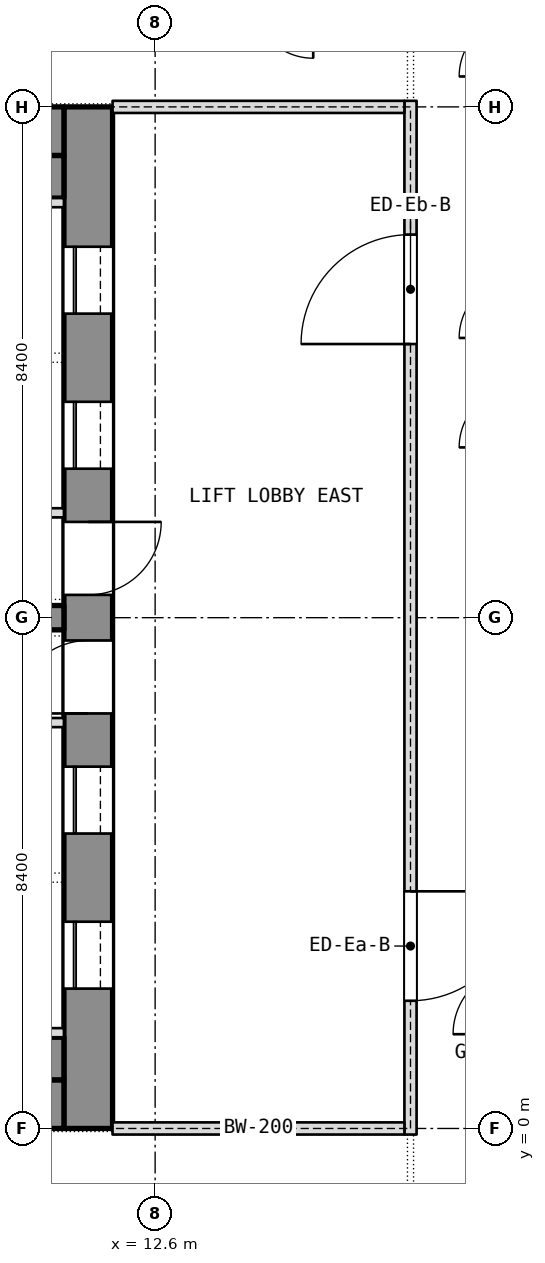
"""IFC4 building model, lengths in metres.
Left out: names, types, materials, properties, quantities, classifications, styles, units other than length and angle.
Written with IfcOpenShell. Run it as: python <this file> out.ifc"""

import sys

from ifc_helpers import new_model, si_unit, direction, frame, frame_2d, origin, place, context, subcontext, project, spatial, rectangle, extrude, element, fill, save


model = new_model("IFC4")
c1 = context("Model", 3, precision=1e-05, world=origin(), true_north=direction((0.0, 1.0)))
c2 = subcontext(c1, "Body", "Model", "MODEL_VIEW")
j1 = project(units=[si_unit("LENGTHUNIT", "METRE"), si_unit("PLANEANGLEUNIT", "RADIAN")], contexts=[c1])
p1 = place(None, origin())
s1 = spatial("IfcSite", under=j1, at=p1, CompositionType="ELEMENT")
p2 = place(p1, origin())
s2 = spatial("IfcBuilding", under=s1, at=p2, CompositionType="ELEMENT")
p3 = place(p2, frame((0.0, 0.0, 234.5)))
s3 = spatial("IfcBuildingStorey", under=s2, at=p3, CompositionType="ELEMENT", Elevation=234.5)
p4 = place(p3, frame((11.5, 0.0, 0.0), z_axis=(0.0, 0.0, 1.0), x_axis=(0.0, 1.0, 0.0)))
e1 = element("IfcWall", 1, at=p4, inside=s3, PredefinedType="SHEAR", context=c2, shape_type="SweptSolid", body=[
    extrude(rectangle(XDim=16.8, YDim=0.8, at=frame_2d((8.4, 0.0))), origin(), (0.0, 0.0, 1.0), 3.6),
])
p5 = place(p4, frame((2.3, 0.0, 0.0)))
e2 = element("IfcOpeningElement", 2, at=p5, cuts=e1, PredefinedType="OPENING", context=c2, shape_type="SweptSolid", body=[
    extrude(rectangle(XDim=1.1, YDim=2.1, at=frame_2d((0.55, 1.05))), frame((0.0, 0.4, 0.0), z_axis=(0.0, -1.0, 0.0), x_axis=(1.0, 0.0, 0.0)), (0.0, 0.0, 1.0), 0.8),
])
p6 = place(p4, frame((4.85, 0.0, 0.0)))
e3 = element("IfcOpeningElement", 3, at=p6, cuts=e1, PredefinedType="OPENING", context=c2, shape_type="SweptSolid", body=[
    extrude(rectangle(XDim=1.1, YDim=2.1, at=frame_2d((0.55, 1.05))), frame((0.0, 0.4, 0.0), z_axis=(0.0, -1.0, 0.0), x_axis=(1.0, 0.0, 0.0)), (0.0, 0.0, 1.0), 0.8),
])
p7 = place(p4, frame((6.825, 0.0, 0.0)))
e4 = element("IfcOpeningElement", 4, at=p7, cuts=e1, PredefinedType="OPENING", context=c2, shape_type="SweptSolid", body=[
    extrude(rectangle(XDim=1.2, YDim=2.1, at=frame_2d((0.6, 1.05))), frame((0.0, 0.4, 0.0), z_axis=(0.0, -1.0, 0.0), x_axis=(1.0, 0.0, 0.0)), (0.0, 0.0, 1.0), 0.8),
])
p8 = place(p4, frame((13.4, 0.0, 0.0)))
e5 = element("IfcOpeningElement", 5, at=p8, cuts=e1, PredefinedType="OPENING", context=c2, shape_type="SweptSolid", body=[
    extrude(rectangle(XDim=1.1, YDim=2.1, at=frame_2d((0.55, 1.05))), frame((0.0, 0.4, 0.0), z_axis=(0.0, -1.0, 0.0), x_axis=(1.0, 0.0, 0.0)), (0.0, 0.0, 1.0), 0.8),
])
p9 = place(p4, frame((10.85, 0.0, 0.0)))
e6 = element("IfcOpeningElement", 6, at=p9, cuts=e1, PredefinedType="OPENING", context=c2, shape_type="SweptSolid", body=[
    extrude(rectangle(XDim=1.1, YDim=2.1, at=frame_2d((0.55, 1.05))), frame((0.0, 0.4, 0.0), z_axis=(0.0, -1.0, 0.0), x_axis=(1.0, 0.0, 0.0)), (0.0, 0.0, 1.0), 0.8),
])
p10 = place(p4, frame((8.775, 0.0, 0.0)))
e7 = element("IfcOpeningElement", 7, at=p10, cuts=e1, PredefinedType="OPENING", context=c2, shape_type="SweptSolid", body=[
    extrude(rectangle(XDim=1.2, YDim=2.1, at=frame_2d((0.6, 1.05))), frame((0.0, 0.4, 0.0), z_axis=(0.0, -1.0, 0.0), x_axis=(1.0, 0.0, 0.0)), (0.0, 0.0, 1.0), 0.8),
])
for number, where, z_axis, x_axis in (
    (8, (-11.1, 0.4, 0.0), (0.0, 0.0, 1.0), (1.0, 0.0, 0.0)),
    (9, (-11.1, 16.4, 0.0), (0.0, 0.0, 1.0), (1.0, 0.0, 0.0)),
):
    element("IfcWall", number, at=place(p3, frame(where, z_axis=z_axis, x_axis=x_axis)), inside=s3, PredefinedType="SHEAR", context=c2, shape_type="SweptSolid", body=[
        extrude(rectangle(XDim=22.2, YDim=0.8, at=frame_2d((11.1, 0.0))), origin(), (0.0, 0.0, 1.0), 3.6),
    ])
p11 = place(p3, frame((4.4, 8.4, 0.0), z_axis=(0.0, 0.0, 1.0), x_axis=(1.0, 0.0, 0.0)))
e10 = element("IfcWall", 10, at=p11, inside=s3, PredefinedType="SHEAR", context=c2, shape_type="SweptSolid", body=[
    extrude(rectangle(XDim=6.7, YDim=0.4, at=frame_2d((3.35, 0.0))), origin(), (0.0, 0.0, 1.0), 3.6),
])
for number, where, z_axis, x_axis in (
    (11, (-11.1, 1.15, 0.0), (0.0, 0.0, 1.0), (1.0, 0.0, 0.0)),
    (12, (-11.1, 15.65, 0.0), (0.0, 0.0, 1.0), (1.0, 0.0, 0.0)),
):
    element("IfcWall", number, at=place(p3, frame(where, z_axis=z_axis, x_axis=x_axis)), inside=s3, PredefinedType="PARTITIONING", context=c2, shape_type="SweptSolid", body=[
        extrude(rectangle(XDim=22.2, YDim=0.7, at=frame_2d((11.1, 0.0))), origin(), (0.0, 0.0, 1.0), 3.34),
    ])
for number, where, z_axis, x_axis in (
    (13, (9.0, 6.675, 0.0), (0.0, 0.0, 1.0), (1.0, 0.0, 0.0)),
    (14, (9.0, 1.575, 0.0), (0.0, 0.0, 1.0), (1.0, 0.0, 0.0)),
    (15, (9.0, 10.125, 0.0), (0.0, 0.0, 1.0), (1.0, 0.0, 0.0)),
    (16, (9.0, 15.225, 0.0), (0.0, 0.0, 1.0), (1.0, 0.0, 0.0)),
):
    element("IfcWall", number, at=place(p3, frame(where, z_axis=z_axis, x_axis=x_axis)), inside=s3, PredefinedType="SHEAR", context=c2, shape_type="SweptSolid", body=[
        extrude(rectangle(XDim=2.1, YDim=0.15, at=frame_2d((1.05, 0.0))), origin(), (0.0, 0.0, 1.0), 3.6),
    ])
p12 = place(p3, frame((16.8, -0.1, 0.0), z_axis=(0.0, 0.0, 1.0), x_axis=(0.0, 1.0, 0.0)))
e17 = element("IfcWall", 17, at=p12, inside=s3, PredefinedType="PARTITIONING", context=c2, shape_type="SweptSolid", body=[
    extrude(rectangle(XDim=17.0, YDim=0.2, at=frame_2d((8.5, 0.0))), origin(), (0.0, 0.0, 1.0), 3.34),
])
p13 = place(p12, frame((2.2, 0.0, 0.0)))
e18 = element("IfcOpeningElement", 18, at=p13, cuts=e17, PredefinedType="OPENING", context=c2, shape_type="SweptSolid", body=[
    extrude(rectangle(XDim=1.8, YDim=2.1, at=frame_2d((0.9, 1.05))), frame((0.0, 0.1, 0.0), z_axis=(0.0, -1.0, 0.0), x_axis=(1.0, 0.0, 0.0)), (0.0, 0.0, 1.0), 0.2),
])
p14 = place(p12, frame((13.0, 0.0, 0.0)))
e19 = element("IfcOpeningElement", 19, at=p14, cuts=e17, PredefinedType="OPENING", context=c2, shape_type="SweptSolid", body=[
    extrude(rectangle(XDim=1.8, YDim=2.1, at=frame_2d((0.9, 1.05))), frame((0.0, 0.1, 0.0), z_axis=(0.0, -1.0, 0.0), x_axis=(1.0, 0.0, 0.0)), (0.0, 0.0, 1.0), 0.2),
])
for number, where, z_axis, x_axis in (
    (20, (11.9, 0.0, 0.0), (0.0, 0.0, 1.0), (1.0, 0.0, 0.0)),
    (21, (11.9, 16.8, 0.0), (0.0, 0.0, 1.0), (1.0, 0.0, 0.0)),
):
    element("IfcWall", number, at=place(p3, frame(where, z_axis=z_axis, x_axis=x_axis)), inside=s3, PredefinedType="PARTITIONING", context=c2, shape_type="SweptSolid", body=[
        extrude(rectangle(XDim=4.8, YDim=0.2, at=frame_2d((2.4, 0.0))), origin(), (0.0, 0.0, 1.0), 2.94),
    ])
p15 = place(p5, origin())
e22 = element("IfcDoor", 22, at=p15, inside=s3, OperationType="SLIDING_TO_LEFT", PredefinedType="DOOR", context=c2, shape_type="SweptSolid", body=[
    extrude(rectangle(XDim=1.1, YDim=2.1, at=frame_2d((0.55, 1.05))), frame((0.0, 0.025, 0.0), z_axis=(0.0, -1.0, 0.0), x_axis=(1.0, 0.0, 0.0)), (0.0, 0.0, 1.0), 0.05),
])
fill(e2, e22)
p16 = place(p6, origin())
e23 = element("IfcDoor", 23, at=p16, inside=s3, OperationType="SLIDING_TO_LEFT", PredefinedType="DOOR", context=c2, shape_type="SweptSolid", body=[
    extrude(rectangle(XDim=1.1, YDim=2.1, at=frame_2d((0.55, 1.05))), frame((0.0, 0.025, 0.0), z_axis=(0.0, -1.0, 0.0), x_axis=(1.0, 0.0, 0.0)), (0.0, 0.0, 1.0), 0.05),
])
fill(e3, e23)
p17 = place(p7, origin())
e24 = element("IfcDoor", 24, at=p17, inside=s3, OperationType="SINGLE_SWING_LEFT", PredefinedType="DOOR", context=c2, shape_type="SweptSolid", body=[
    extrude(rectangle(XDim=1.2, YDim=2.1, at=frame_2d((0.6, 1.05))), frame((0.0, 0.025, 0.0), z_axis=(0.0, -1.0, 0.0), x_axis=(1.0, 0.0, 0.0)), (0.0, 0.0, 1.0), 0.05),
])
fill(e4, e24)
p18 = place(p8, origin())
e25 = element("IfcDoor", 25, at=p18, inside=s3, OperationType="SLIDING_TO_LEFT", PredefinedType="DOOR", context=c2, shape_type="SweptSolid", body=[
    extrude(rectangle(XDim=1.1, YDim=2.1, at=frame_2d((0.55, 1.05))), frame((0.0, 0.025, 0.0), z_axis=(0.0, -1.0, 0.0), x_axis=(1.0, 0.0, 0.0)), (0.0, 0.0, 1.0), 0.05),
])
fill(e5, e25)
p19 = place(p9, origin())
e26 = element("IfcDoor", 26, at=p19, inside=s3, OperationType="SLIDING_TO_LEFT", PredefinedType="DOOR", context=c2, shape_type="SweptSolid", body=[
    extrude(rectangle(XDim=1.1, YDim=2.1, at=frame_2d((0.55, 1.05))), frame((0.0, 0.025, 0.0), z_axis=(0.0, -1.0, 0.0), x_axis=(1.0, 0.0, 0.0)), (0.0, 0.0, 1.0), 0.05),
])
fill(e6, e26)
p20 = place(p10, origin())
e27 = element("IfcDoor", 27, at=p20, inside=s3, OperationType="SINGLE_SWING_LEFT", PredefinedType="DOOR", context=c2, shape_type="SweptSolid", body=[
    extrude(rectangle(XDim=1.2, YDim=2.1, at=frame_2d((0.6, 1.05))), frame((0.0, 0.025, 0.0), z_axis=(0.0, -1.0, 0.0), x_axis=(1.0, 0.0, 0.0)), (0.0, 0.0, 1.0), 0.05),
])
fill(e7, e27)
p21 = place(p13, origin())
e28 = element("IfcDoor", 28, at=p21, inside=s3, OperationType="DOUBLE_DOOR_SINGLE_SWING", PredefinedType="DOOR", context=c2, shape_type="SweptSolid", body=[
    extrude(rectangle(XDim=1.8, YDim=2.1, at=frame_2d((0.9, 1.05))), frame((0.0, 0.025, 0.0), z_axis=(0.0, -1.0, 0.0), x_axis=(1.0, 0.0, 0.0)), (0.0, 0.0, 1.0), 0.05),
])
fill(e18, e28)
p22 = place(p14, origin())
e29 = element("IfcDoor", 29, at=p22, inside=s3, OperationType="DOUBLE_DOOR_SINGLE_SWING", PredefinedType="DOOR", context=c2, shape_type="SweptSolid", body=[
    extrude(rectangle(XDim=1.8, YDim=2.1, at=frame_2d((0.9, 1.05))), frame((0.0, 0.025, 0.0), z_axis=(0.0, -1.0, 0.0), x_axis=(1.0, 0.0, 0.0)), (0.0, 0.0, 1.0), 0.05),
])
fill(e19, e29)
save(model, sys.argv[1])
